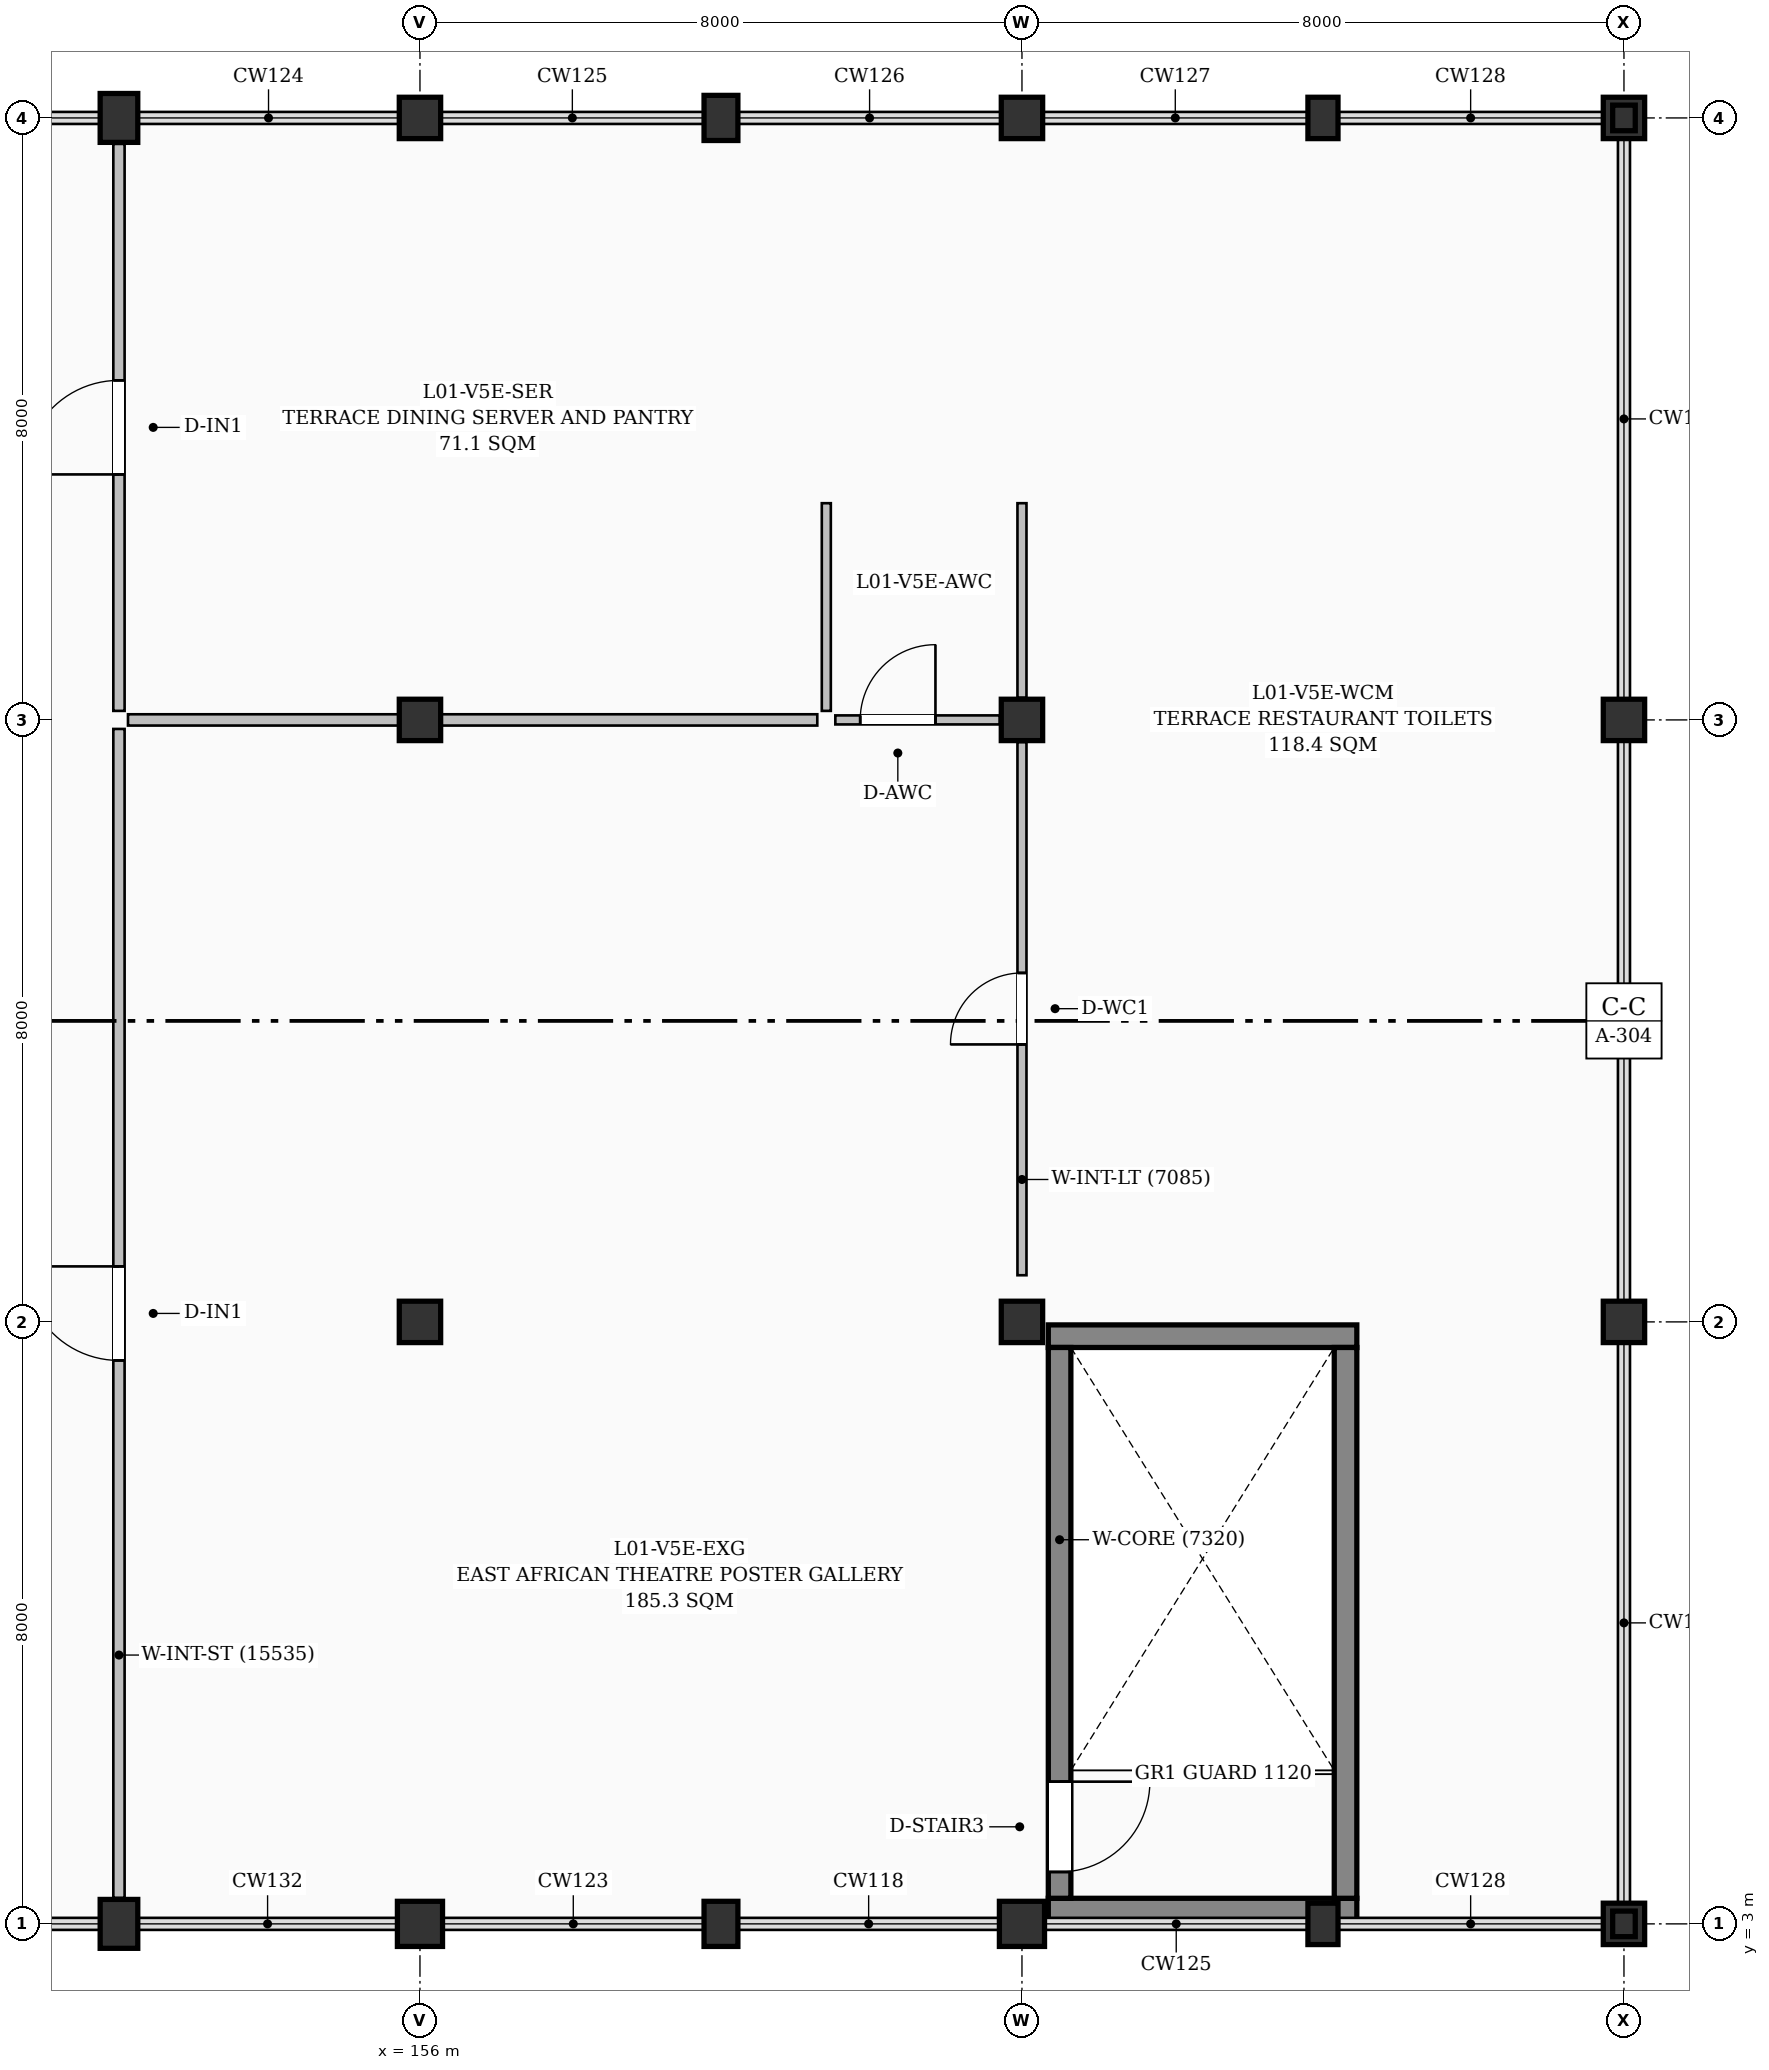
"""IFC4 building model, lengths in metres.
Left out: names, types, materials, properties, quantities, classifications, styles, units other than length and angle.
Written with IfcOpenShell. Run it as: python <this file> out.ifc"""

import sys

from ifc_helpers import new_model, si_unit, direction, frame, frame_2d, origin, origin_2d, place, context, subcontext, project, spatial, rectangle, circle, i_section, extrude, element, fill, save


model = new_model("IFC4")
c1 = context("Model", 3, precision=1e-05, world=origin(), true_north=direction((0.0, 1.0)))
c2 = subcontext(c1, "Body", "Model", "MODEL_VIEW")
j1 = project(units=[si_unit("LENGTHUNIT", "METRE"), si_unit("PLANEANGLEUNIT", "RADIAN")], contexts=[c1])
p1 = place(None, origin())
s1 = spatial("IfcSite", under=j1, at=p1, CompositionType="ELEMENT")
p2 = place(p1, origin())
s2 = spatial("IfcBuilding", under=s1, at=p2, CompositionType="ELEMENT")
p3 = place(p2, frame((0.0, 0.0, 4.8)))
s3 = spatial("IfcBuildingStorey", under=s2, at=p3, CompositionType="ELEMENT", Elevation=4.8)
for number, where, z_axis, x_axis in (
    (1, (152.0, 3.0, 0.0), (0.0, 0.0, 1.0), (1.0, 0.0, 0.0)),
    (2, (152.0, 27.0, 0.0), (0.0, 0.0, 1.0), (1.0, 0.0, 0.0)),
):
    element("IfcColumn", number, at=place(p3, frame(where, z_axis=z_axis, x_axis=x_axis)), inside=s3, PredefinedType="PILASTER", context=c2, shape_type="SweptSolid", body=[
        extrude(rectangle(XDim=0.5, YDim=0.65, at=origin_2d()), origin(), (0.0, 0.0, 1.0), 4.5),
    ])
p4 = place(p3, frame((156.0, 3.0, 0.0), z_axis=(0.0, 0.0, 1.0), x_axis=(1.0, 0.0, 0.0)))
e3 = element("IfcColumn", 3, at=p4, inside=s3, PredefinedType="COLUMN", context=c2, shape_type="SweptSolid", body=[
    extrude(circle(Radius=0.3, at=origin_2d()), origin(), (0.0, 0.0, 1.0), 4.5),
])
for number, where, z_axis, x_axis in (
    (4, (156.0, 11.0, 0.0), (0.0, 0.0, 1.0), (1.0, 0.0, 0.0)),
    (5, (156.0, 19.0, 0.0), (0.0, 0.0, 1.0), (1.0, 0.0, 0.0)),
    (6, (156.0, 27.0, 0.0), (0.0, 0.0, 1.0), (1.0, 0.0, 0.0)),
):
    element("IfcColumn", number, at=place(p3, frame(where, z_axis=z_axis, x_axis=x_axis)), inside=s3, PredefinedType="COLUMN", context=c2, shape_type="SweptSolid", body=[
        extrude(rectangle(XDim=0.55, YDim=0.55, at=origin_2d()), origin(), (0.0, 0.0, 1.0), 4.5),
    ])
for number, where, z_axis, x_axis in (
    (7, (160.0, 3.0, 0.0), (0.0, 0.0, 1.0), (1.0, 0.0, 0.0)),
    (8, (160.0, 27.0, 0.0), (0.0, 0.0, 1.0), (1.0, 0.0, 0.0)),
):
    element("IfcColumn", number, at=place(p3, frame(where, z_axis=z_axis, x_axis=x_axis)), inside=s3, PredefinedType="PILASTER", context=c2, shape_type="SweptSolid", body=[
        extrude(rectangle(XDim=0.45, YDim=0.6, at=origin_2d()), origin(), (0.0, 0.0, 1.0), 4.5),
    ])
p5 = place(p3, frame((164.0, 3.0, 0.0), z_axis=(0.0, 0.0, 1.0), x_axis=(1.0, 0.0, 0.0)))
e9 = element("IfcColumn", 9, at=p5, inside=s3, PredefinedType="COLUMN", context=c2, shape_type="SweptSolid", body=[
    extrude(circle(Radius=0.3, at=origin_2d()), origin(), (0.0, 0.0, 1.0), 4.5),
])
for number, where, z_axis, x_axis in (
    (10, (164.0, 11.0, 0.0), (0.0, 0.0, 1.0), (1.0, 0.0, 0.0)),
    (11, (164.0, 19.0, 0.0), (0.0, 0.0, 1.0), (1.0, 0.0, 0.0)),
    (12, (164.0, 27.0, 0.0), (0.0, 0.0, 1.0), (1.0, 0.0, 0.0)),
):
    element("IfcColumn", number, at=place(p3, frame(where, z_axis=z_axis, x_axis=x_axis)), inside=s3, PredefinedType="COLUMN", context=c2, shape_type="SweptSolid", body=[
        extrude(rectangle(XDim=0.55, YDim=0.55, at=origin_2d()), origin(), (0.0, 0.0, 1.0), 4.5),
    ])
for number, where, z_axis, x_axis in (
    (13, (168.0, 3.0, 0.0), (0.0, 0.0, 1.0), (1.0, 0.0, 0.0)),
    (14, (168.0, 27.0, 0.0), (0.0, 0.0, 1.0), (1.0, 0.0, 0.0)),
):
    element("IfcColumn", number, at=place(p3, frame(where, z_axis=z_axis, x_axis=x_axis)), inside=s3, PredefinedType="PILASTER", context=c2, shape_type="SweptSolid", body=[
        extrude(rectangle(XDim=0.4, YDim=0.55, at=origin_2d()), origin(), (0.0, 0.0, 1.0), 4.5),
    ])
for number, where, z_axis, x_axis in (
    (15, (172.0, 3.0, 0.0), (0.0, 0.0, 1.0), (1.0, 0.0, 0.0)),
    (16, (172.0, 11.0, 0.0), (0.0, 0.0, 1.0), (1.0, 0.0, 0.0)),
    (17, (172.0, 19.0, 0.0), (0.0, 0.0, 1.0), (1.0, 0.0, 0.0)),
    (18, (172.0, 27.0, 0.0), (0.0, 0.0, 1.0), (1.0, 0.0, 0.0)),
):
    element("IfcColumn", number, at=place(p3, frame(where, z_axis=z_axis, x_axis=x_axis)), inside=s3, PredefinedType="COLUMN", context=c2, shape_type="SweptSolid", body=[
        extrude(rectangle(XDim=0.55, YDim=0.55, at=origin_2d()), origin(), (0.0, 0.0, 1.0), 4.5),
    ])
for number, where, z_axis, x_axis in (
    (19, (172.0, 3.0, 4.5), (0.0, 0.0, 1.0), (1.0, 0.0, 0.0)),
    (20, (172.0, 27.0, 4.5), (0.0, 0.0, 1.0), (1.0, 0.0, 0.0)),
):
    element("IfcColumn", number, at=place(p3, frame(where, z_axis=z_axis, x_axis=x_axis)), inside=s3, PredefinedType="COLUMN", context=c2, shape_type="SweptSolid", body=[
        extrude(i_section(OverallWidth=0.3, OverallDepth=0.34, WebThickness=0.012, FlangeThickness=0.021, FilletRadius=0.027, at=origin_2d()), origin(), (0.0, 0.0, 1.0), 1.564),
    ])
for number, where, z_axis, x_axis in (
    (21, (164.35, 3.19, 0.0), (0.0, 0.0, 1.0), (1.0, 0.0, 0.0)),
    (22, (168.45, 10.81, 0.0), (0.0, 0.0, 1.0), (-1.0, 0.0, 0.0)),
):
    element("IfcWall", number, at=place(p3, frame(where, z_axis=z_axis, x_axis=x_axis)), inside=s3, PredefinedType="SHEAR", context=c2, shape_type="SweptSolid", body=[
        extrude(rectangle(XDim=4.1, YDim=0.3, at=frame_2d((2.05, 0.0))), origin(), (0.0, 0.0, 1.0), 4.25),
    ])
p6 = place(p3, frame((164.5, 10.66, 0.0), z_axis=(0.0, 0.0, 1.0), x_axis=(0.0, -1.0, 0.0)))
e23 = element("IfcWall", 23, at=p6, inside=s3, PredefinedType="SHEAR", context=c2, shape_type="SweptSolid", body=[
    extrude(rectangle(XDim=7.32, YDim=0.3, at=frame_2d((3.66, 0.0))), origin(), (0.0, 0.0, 1.0), 4.25),
])
p7 = place(p6, frame((5.77, 0.0, 0.0)))
e24 = element("IfcOpeningElement", 24, at=p7, cuts=e23, PredefinedType="OPENING", context=c2, shape_type="SweptSolid", body=[
    extrude(rectangle(XDim=1.2, YDim=2.15, at=frame_2d((0.6, 1.075))), frame((0.0, 0.16, 0.0), z_axis=(0.0, -1.0, 0.0), x_axis=(1.0, 0.0, 0.0)), (0.0, 0.0, 1.0), 0.32),
])
p8 = place(p3, frame((168.3, 10.66, 0.0), z_axis=(0.0, 0.0, 1.0), x_axis=(0.0, -1.0, 0.0)))
e25 = element("IfcWall", 25, at=p8, inside=s3, PredefinedType="SHEAR", context=c2, shape_type="SweptSolid", body=[
    extrude(rectangle(XDim=7.32, YDim=0.3, at=frame_2d((3.66, 0.0))), origin(), (0.0, 0.0, 1.0), 4.25),
])
p9 = place(p3, frame((152.0, 3.345, 0.0), z_axis=(0.0, 0.0, 1.0), x_axis=(0.0, 1.0, 0.0)))
e26 = element("IfcWall", 26, at=p9, inside=s3, PredefinedType="PARTITIONING", context=c2, shape_type="SweptSolid", body=[
    extrude(rectangle(XDim=15.535, YDim=0.15, at=frame_2d((7.768, 0.0))), origin(), (0.0, 0.0, 1.0), 4.25),
])
p10 = place(p9, frame((7.143, 0.0, 0.0)))
e27 = element("IfcOpeningElement", 27, at=p10, cuts=e26, PredefinedType="OPENING", context=c2, shape_type="SweptSolid", body=[
    extrude(rectangle(XDim=1.25, YDim=2.15, at=frame_2d((0.625, 1.075))), frame((0.0, 0.085, 0.0), z_axis=(0.0, -1.0, 0.0), x_axis=(1.0, 0.0, 0.0)), (0.0, 0.0, 1.0), 0.17),
])
p11 = place(p3, frame((152.0, 19.12, 0.0), z_axis=(0.0, 0.0, 1.0), x_axis=(0.0, 1.0, 0.0)))
e28 = element("IfcWall", 28, at=p11, inside=s3, PredefinedType="PARTITIONING", context=c2, shape_type="SweptSolid", body=[
    extrude(rectangle(XDim=7.535, YDim=0.15, at=frame_2d((3.768, 0.0))), origin(), (0.0, 0.0, 1.0), 4.25),
])
p12 = place(p11, frame((3.143, 0.0, 0.0)))
e29 = element("IfcOpeningElement", 29, at=p12, cuts=e28, PredefinedType="OPENING", context=c2, shape_type="SweptSolid", body=[
    extrude(rectangle(XDim=1.25, YDim=2.15, at=frame_2d((0.625, 1.075))), frame((0.0, 0.085, 0.0), z_axis=(0.0, -1.0, 0.0), x_axis=(1.0, 0.0, 0.0)), (0.0, 0.0, 1.0), 0.17),
])
p13 = place(p3, frame((152.12, 19.0, 0.0), z_axis=(0.0, 0.0, 1.0), x_axis=(1.0, 0.0, 0.0)))
e30 = element("IfcWall", 30, at=p13, inside=s3, PredefinedType="PARTITIONING", context=c2, shape_type="SweptSolid", body=[
    extrude(rectangle(XDim=9.16, YDim=0.15, at=frame_2d((4.58, 0.0))), origin(), (0.0, 0.0, 1.0), 4.25),
])
p14 = place(p3, frame((161.52, 19.0, 0.0), z_axis=(0.0, 0.0, 1.0), x_axis=(1.0, 0.0, 0.0)))
e31 = element("IfcWall", 31, at=p14, inside=s3, PredefinedType="PARTITIONING", context=c2, shape_type="SweptSolid", body=[
    extrude(rectangle(XDim=2.185, YDim=0.12, at=frame_2d((1.093, 0.0))), origin(), (0.0, 0.0, 1.0), 4.25),
])
p15 = place(p14, frame((0.33, 0.0, 0.0)))
e32 = element("IfcOpeningElement", 32, at=p15, cuts=e31, PredefinedType="OPENING", context=c2, shape_type="SweptSolid", body=[
    extrude(rectangle(XDim=1.0, YDim=2.1, at=frame_2d((0.5, 1.05))), frame((0.0, 0.07, 0.0), z_axis=(0.0, -1.0, 0.0), x_axis=(1.0, 0.0, 0.0)), (0.0, 0.0, 1.0), 0.14),
])
p16 = place(p3, frame((164.0, 11.62, 0.0), z_axis=(0.0, 0.0, 1.0), x_axis=(0.0, 1.0, 0.0)))
e33 = element("IfcWall", 33, at=p16, inside=s3, PredefinedType="PARTITIONING", context=c2, shape_type="SweptSolid", body=[
    extrude(rectangle(XDim=7.085, YDim=0.12, at=frame_2d((3.542, 0.0))), origin(), (0.0, 0.0, 1.0), 4.25),
])
p17 = place(p16, frame((3.067, 0.0, 0.0)))
e34 = element("IfcOpeningElement", 34, at=p17, cuts=e33, PredefinedType="OPENING", context=c2, shape_type="SweptSolid", body=[
    extrude(rectangle(XDim=0.95, YDim=2.1, at=frame_2d((0.475, 1.05))), frame((0.0, 0.07, 0.0), z_axis=(0.0, -1.0, 0.0), x_axis=(1.0, 0.0, 0.0)), (0.0, 0.0, 1.0), 0.14),
])
p18 = place(p3, frame((161.4, 19.12, 0.0), z_axis=(0.0, 0.0, 1.0), x_axis=(0.0, 1.0, 0.0)))
e35 = element("IfcWall", 35, at=p18, inside=s3, PredefinedType="PARTITIONING", context=c2, shape_type="SweptSolid", body=[
    extrude(rectangle(XDim=2.76, YDim=0.12, at=frame_2d((1.38, 0.0))), origin(), (0.0, 0.0, 1.0), 4.25),
])
p19 = place(p3, frame((164.0, 19.295, 0.0), z_axis=(0.0, 0.0, 1.0), x_axis=(0.0, 1.0, 0.0)))
e36 = element("IfcWall", 36, at=p19, inside=s3, PredefinedType="PARTITIONING", context=c2, shape_type="SweptSolid", body=[
    extrude(rectangle(XDim=2.585, YDim=0.12, at=frame_2d((1.292, 0.0))), origin(), (0.0, 0.0, 1.0), 4.25),
])
p20 = place(p7, origin())
e37 = element("IfcDoor", 37, at=p20, inside=s3, OperationType="SINGLE_SWING_LEFT", PredefinedType="DOOR", context=c2, shape_type="SweptSolid", body=[
    extrude(rectangle(XDim=1.2, YDim=2.15, at=frame_2d((0.6, 1.075))), frame((0.0, 0.025, 0.0), z_axis=(0.0, -1.0, 0.0), x_axis=(1.0, 0.0, 0.0)), (0.0, 0.0, 1.0), 0.05),
])
fill(e24, e37)
p21 = place(p10, origin())
e38 = element("IfcDoor", 38, at=p21, inside=s3, OperationType="SINGLE_SWING_RIGHT", PredefinedType="DOOR", context=c2, shape_type="SweptSolid", body=[
    extrude(rectangle(XDim=1.25, YDim=2.15, at=frame_2d((0.625, 1.075))), frame((0.0, 0.025, 0.0), z_axis=(0.0, -1.0, 0.0), x_axis=(1.0, 0.0, 0.0)), (0.0, 0.0, 1.0), 0.05),
])
fill(e27, e38)
p22 = place(p12, origin())
e39 = element("IfcDoor", 39, at=p22, inside=s3, OperationType="SINGLE_SWING_LEFT", PredefinedType="DOOR", context=c2, shape_type="SweptSolid", body=[
    extrude(rectangle(XDim=1.25, YDim=2.15, at=frame_2d((0.625, 1.075))), frame((0.0, 0.025, 0.0), z_axis=(0.0, -1.0, 0.0), x_axis=(1.0, 0.0, 0.0)), (0.0, 0.0, 1.0), 0.05),
])
fill(e29, e39)
p23 = place(p15, origin())
e40 = element("IfcDoor", 40, at=p23, inside=s3, OperationType="SINGLE_SWING_RIGHT", PredefinedType="DOOR", context=c2, shape_type="SweptSolid", body=[
    extrude(rectangle(XDim=1.0, YDim=2.1, at=frame_2d((0.5, 1.05))), frame((0.0, 0.025, 0.0), z_axis=(0.0, -1.0, 0.0), x_axis=(1.0, 0.0, 0.0)), (0.0, 0.0, 1.0), 0.05),
])
fill(e32, e40)
p24 = place(p17, origin())
e41 = element("IfcDoor", 41, at=p24, inside=s3, OperationType="SINGLE_SWING_LEFT", PredefinedType="DOOR", context=c2, shape_type="SweptSolid", body=[
    extrude(rectangle(XDim=0.95, YDim=2.1, at=frame_2d((0.475, 1.05))), frame((0.0, 0.025, 0.0), z_axis=(0.0, -1.0, 0.0), x_axis=(1.0, 0.0, 0.0)), (0.0, 0.0, 1.0), 0.05),
])
fill(e34, e41)
save(model, sys.argv[1])
